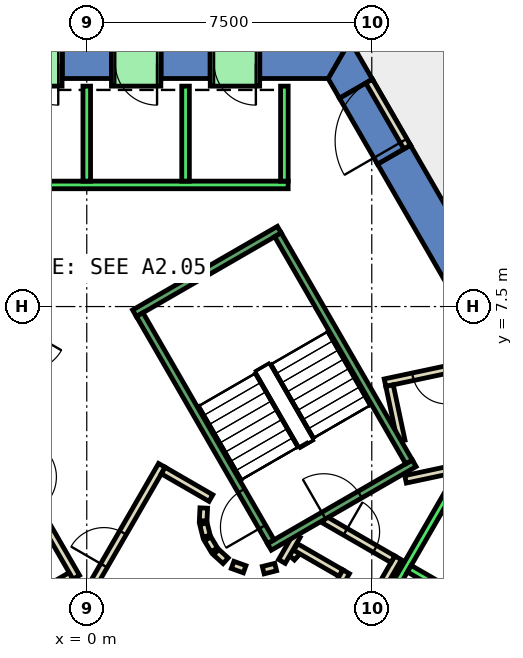
"""IFC4 building model, lengths in metres.
Left out: names, types, materials, properties, quantities, classifications, styles, units other than length and angle.
Written with IfcOpenShell. Run it as: python <this file> out.ifc"""

import sys

from ifc_helpers import new_model, si_unit, direction, frame, frame_2d, origin, place, context, subcontext, project, spatial, polyline, rectangle, outline, extrude, element, fill, save


model = new_model("IFC4")
c1 = context("Model", 3, precision=1e-05, world=origin(), true_north=direction((0.0, 1.0)))
c2 = subcontext(c1, "Body", "Model", "MODEL_VIEW")
j1 = project(units=[si_unit("LENGTHUNIT", "METRE"), si_unit("PLANEANGLEUNIT", "RADIAN")], contexts=[c1])
p1 = place(None, origin())
s1 = spatial("IfcSite", under=j1, at=p1, CompositionType="ELEMENT")
p2 = place(p1, origin())
s2 = spatial("IfcBuilding", under=s1, at=p2, CompositionType="ELEMENT")
p3 = place(p2, frame((0.0, 0.0, 9.0)))
s3 = spatial("IfcBuildingStorey", under=s2, at=p3, CompositionType="ELEMENT", Elevation=9.0)
p4 = place(p3, frame((0.0, 0.0, -0.45)))
e1 = element("IfcWall", 1, at=p4, inside=s3, PredefinedType="SHEAR", context=c2, shape_type="SweptSolid", body=[
    extrude(outline(polyline([(8.517, 11.748), (7.651, 11.248), (12.702, 2.5), (13.856, 2.5), (8.517, 11.748)])), origin(), (0.0, 0.0, 1.0), 6.0),
])
p5 = place(p3, frame((0.0, 0.0, -0.45)))
e2 = element("IfcWall", 2, at=p5, inside=s3, PredefinedType="SHEAR", context=c2, shape_type="SweptSolid", body=[
    extrude(outline(polyline([(6.651, 12.98), (7.517, 13.48), (6.928, 14.5), (6.351, 13.5), (6.651, 12.98)])), origin(), (0.0, 0.0, 1.0), 6.0),
])
p6 = place(p3, frame((0.0, 0.0, 3.6)))
e3 = element("IfcWall", 3, at=p6, inside=s3, PredefinedType="SHEAR", context=c2, shape_type="SweptSolid", body=[
    extrude(outline(polyline([(7.517, 13.48), (6.651, 12.98), (7.651, 11.248), (8.517, 11.748), (7.517, 13.48)])), origin(), (0.0, 0.0, 1.0), 1.95),
])
p7 = place(p3, frame((0.0, 0.0, -0.45)))
e4 = element("IfcWall", 4, at=p7, inside=s3, PredefinedType="SHEAR", context=c2, shape_type="SweptSolid", body=[
    extrude(outline(polyline([(4.55, 14.5), (4.55, 13.5), (6.351, 13.5), (6.928, 14.5), (4.55, 14.5)])), origin(), (0.0, 0.0, 1.0), 6.0),
])
p8 = place(p3, frame((0.0, 0.0, -0.45)))
e5 = element("IfcWall", 5, at=p8, inside=s3, PredefinedType="SHEAR", context=c2, shape_type="SweptSolid", body=[
    extrude(outline(polyline([(1.95, 14.5), (1.95, 13.5), (3.25, 13.5), (3.25, 14.5), (1.95, 14.5)])), origin(), (0.0, 0.0, 1.0), 6.0),
])
p9 = place(p3, frame((0.0, 0.0, -0.45)))
e6 = element("IfcWall", 6, at=p9, inside=s3, PredefinedType="SHEAR", context=c2, shape_type="SweptSolid", body=[
    extrude(outline(polyline([(-0.65, 14.5), (-0.65, 13.5), (0.65, 13.5), (0.65, 14.5), (-0.65, 14.5)])), origin(), (0.0, 0.0, 1.0), 6.0),
])
p10 = place(p3, frame((0.0, 0.0, 3.6)))
e7 = element("IfcWall", 7, at=p10, inside=s3, PredefinedType="SHEAR", context=c2, shape_type="SweptSolid", body=[
    extrude(outline(polyline([(3.25, 14.5), (3.25, 13.5), (4.55, 13.5), (4.55, 14.5), (3.25, 14.5)])), origin(), (0.0, 0.0, 1.0), 1.95),
])
p11 = place(p3, frame((0.0, 0.0, 3.6)))
e8 = element("IfcWall", 8, at=p11, inside=s3, PredefinedType="SHEAR", context=c2, shape_type="SweptSolid", body=[
    extrude(outline(polyline([(0.65, 14.5), (0.65, 13.5), (1.95, 13.5), (1.95, 14.5), (0.65, 14.5)])), origin(), (0.0, 0.0, 1.0), 1.95),
])
p12 = place(p3, frame((0.0, 0.0, 3.6)))
e9 = element("IfcWall", 9, at=p12, inside=s3, PredefinedType="SHEAR", context=c2, shape_type="SweptSolid", body=[
    extrude(outline(polyline([(-1.95, 14.5), (-1.95, 13.5), (-0.65, 13.5), (-0.65, 14.5), (-1.95, 14.5)])), origin(), (0.0, 0.0, 1.0), 1.95),
])
p13 = place(p3, frame((5.39, 0.898, 0.0), z_axis=(0.0, 0.0, 1.0), x_axis=(0.673828488714, 0.738887791073, 0.0)))
e10 = element("IfcWall", 10, at=p13, inside=s3, PredefinedType="PARTITIONING", context=c2, shape_type="SweptSolid", body=[
    extrude(rectangle(XDim=0.263, YDim=0.2, at=frame_2d((0.131, 0.0))), origin(), (0.0, 0.0, 1.0), 5.55),
])
p14 = place(p3, frame((5.499, 1.172, 0.0), z_axis=(0.0, 0.0, 1.0), x_axis=(0.866333505267, -0.499465972466, 0.0)))
e11 = element("IfcWall", 11, at=p14, inside=s3, PredefinedType="PARTITIONING", context=c2, shape_type="SweptSolid", body=[
    extrude(rectangle(XDim=1.374, YDim=0.2, at=frame_2d((0.687, 0.0))), origin(), (0.0, 0.0, 1.0), 5.55),
])
p15 = place(p3, frame((6.826, 0.522, 0.0), z_axis=(0.0, 0.0, 1.0), x_axis=(-0.500016722714, -0.866015748706, 0.0)))
e12 = element("IfcWall", 12, at=p15, inside=s3, PredefinedType="PARTITIONING", context=c2, shape_type="SweptSolid", body=[
    extrude(rectangle(XDim=1.7, YDim=0.2, at=frame_2d((0.85, 0.0))), origin(), (0.0, 0.0, 1.0), 5.55),
])
p16 = place(p3, frame((8.192, 0.888, 0.0), z_axis=(0.0, 0.0, 1.0), x_axis=(-0.499940625693, -0.866059680843, 0.0)))
e13 = element("IfcWall", 13, at=p16, inside=s3, PredefinedType="PARTITIONING", context=c2, shape_type="SweptSolid", body=[
    extrude(rectangle(XDim=2.68, YDim=0.2, at=frame_2d((1.34, 0.0))), origin(), (0.0, 0.0, 1.0), 5.55),
])
p17 = place(p3, frame((5.135, 0.793, 0.0), z_axis=(0.0, 0.0, 1.0), x_axis=(0.499526442893, 0.866298639529, 0.0)))
e14 = element("IfcWall", 14, at=p17, inside=s3, PredefinedType="PARTITIONING", context=c2, shape_type="SweptSolid", body=[
    extrude(rectangle(XDim=0.791, YDim=0.2, at=frame_2d((0.396, 0.0))), origin(), (0.0, 0.0, 1.0), 5.55),
])
p18 = place(p3, frame((6.25, 1.894, 0.0), z_axis=(0.0, 0.0, 1.0), x_axis=(0.866043184279, -0.499969202016, 0.0)))
e15 = element("IfcWall", 15, at=p18, inside=s3, PredefinedType="PARTITIONING", context=c2, shape_type="SweptSolid", body=[
    extrude(rectangle(XDim=2.084, YDim=0.2, at=frame_2d((1.042, 0.0))), origin(), (0.0, 0.0, 1.0), 5.55),
])
p19 = place(p18, frame((0.642, 0.0, 0.0)))
e16 = element("IfcOpeningElement", 16, at=p19, cuts=e15, PredefinedType="OPENING", context=c2, shape_type="SweptSolid", body=[
    extrude(rectangle(XDim=0.9, YDim=2.1, at=frame_2d((0.45, 1.05))), frame((0.0, 0.11, 0.0), z_axis=(0.0, -1.0, 0.0), x_axis=(1.0, 0.0, 0.0)), (0.0, 0.0, 1.0), 0.22),
])
p20 = place(p3, frame((8.389, 2.954, 0.0), z_axis=(0.0, 0.0, 1.0), x_axis=(0.978158333757, 0.207861189501, 0.0)))
e17 = element("IfcWall", 17, at=p20, inside=s3, PredefinedType="PARTITIONING", context=c2, shape_type="SweptSolid", body=[
    extrude(rectangle(XDim=2.4, YDim=0.2, at=frame_2d((1.2, 0.0))), origin(), (0.0, 0.0, 1.0), 5.55),
])
p21 = place(p3, frame((10.196, 5.996, 0.0), z_axis=(0.0, 0.0, 1.0), x_axis=(-0.978155232185, -0.207875784424, 0.0)))
e18 = element("IfcWall", 18, at=p21, inside=s3, PredefinedType="PARTITIONING", context=c2, shape_type="SweptSolid", body=[
    extrude(rectangle(XDim=2.401, YDim=0.2, at=frame_2d((1.2, 0.0))), origin(), (0.0, 0.0, 1.0), 5.55),
])
p22 = place(p21, frame((0.75, 0.0, 0.0)))
e19 = element("IfcOpeningElement", 19, at=p22, cuts=e18, PredefinedType="OPENING", context=c2, shape_type="SweptSolid", body=[
    extrude(rectangle(XDim=0.9, YDim=2.1, at=frame_2d((0.45, 1.05))), frame((0.0, 0.11, 0.0), z_axis=(0.0, -1.0, 0.0), x_axis=(1.0, 0.0, 0.0)), (0.0, 0.0, 1.0), 0.22),
])
p23 = place(p3, frame((7.967, 5.42, 0.0), z_axis=(0.0, 0.0, 1.0), x_axis=(0.207656532783, -0.978201801467, 0.0)))
e20 = element("IfcWall", 20, at=p23, inside=s3, PredefinedType="PARTITIONING", context=c2, shape_type="SweptSolid", body=[
    extrude(rectangle(XDim=1.487, YDim=0.2, at=frame_2d((0.744, 0.0))), origin(), (0.0, 0.0, 1.0), 5.55),
])
p24 = place(p3, frame((3.079, 2.199, 0.0), z_axis=(0.0, 0.0, 1.0), x_axis=(-0.047771483479, -0.998858290933, 0.0)))
e21 = element("IfcWall", 21, at=p24, inside=s3, PredefinedType="PARTITIONING", context=c2, shape_type="SweptSolid", body=[
    extrude(rectangle(XDim=0.337, YDim=0.2, at=frame_2d((0.169, 0.0))), origin(), (0.0, 0.0, 1.0), 5.55),
])
p25 = place(p3, frame((3.07, 1.786, 0.0), z_axis=(0.0, 0.0, 1.0), x_axis=(0.242705583207, -0.970099994784, 0.0)))
e22 = element("IfcWall", 22, at=p25, inside=s3, PredefinedType="PARTITIONING", context=c2, shape_type="SweptSolid", body=[
    extrude(rectangle(XDim=0.338, YDim=0.2, at=frame_2d((0.169, 0.0))), origin(), (0.0, 0.0, 1.0), 5.55),
])
for number, where, z_axis, x_axis in (
    (23, (3.182, 1.388, 0.0), (0.0, 0.0, 1.0), (0.512, -0.859, 0.0)),
    (24, (3.404, 1.039, 0.0), (0.0, 0.0, 1.0), (0.74, -0.672, 0.0)),
):
    element("IfcWall", number, at=place(p3, frame(where, z_axis=z_axis, x_axis=x_axis)), inside=s3, PredefinedType="PARTITIONING", context=c2, shape_type="SweptSolid", body=[
        extrude(rectangle(XDim=0.338, YDim=0.2, at=frame_2d((0.169, 0.0))), origin(), (0.0, 0.0, 1.0), 5.55),
    ])
p26 = place(p3, frame((3.838, 0.702, 0.0), z_axis=(0.0, 0.0, 1.0), x_axis=(0.941035081519, -0.338308993895, 0.0)))
e25 = element("IfcWall", 25, at=p26, inside=s3, PredefinedType="PARTITIONING", context=c2, shape_type="SweptSolid", body=[
    extrude(rectangle(XDim=0.337, YDim=0.2, at=frame_2d((0.168, 0.0))), origin(), (0.0, 0.0, 1.0), 5.55),
])
p27 = place(p3, frame((4.644, 0.564, 0.0), z_axis=(0.0, 0.0, 1.0), x_axis=(0.969929076366, 0.243387729394, 0.0)))
e26 = element("IfcWall", 26, at=p27, inside=s3, PredefinedType="PARTITIONING", context=c2, shape_type="SweptSolid", body=[
    extrude(rectangle(XDim=0.337, YDim=0.2, at=frame_2d((0.168, 0.0))), origin(), (0.0, 0.0, 1.0), 5.55),
])
p28 = place(p3, frame((-0.52, -1.0, 0.0), z_axis=(0.0, 0.0, 1.0), x_axis=(0.50011622646, 0.865958290007, 0.0)))
e27 = element("IfcWall", 27, at=p28, inside=s3, PredefinedType="PARTITIONING", context=c2, shape_type="SweptSolid", body=[
    extrude(rectangle(XDim=4.991, YDim=0.2, at=frame_2d((2.496, 0.0))), origin(), (0.0, 0.0, 1.0), 5.55),
])
p29 = place(p28, frame((1.945, 0.0, 0.0)))
e28 = element("IfcOpeningElement", 28, at=p29, cuts=e27, PredefinedType="OPENING", context=c2, shape_type="SweptSolid", body=[
    extrude(rectangle(XDim=1.0, YDim=2.1, at=frame_2d((0.5, 1.05))), frame((0.0, 0.11, 0.0), z_axis=(0.0, -1.0, 0.0), x_axis=(1.0, 0.0, 0.0)), (0.0, 0.0, 1.0), 0.22),
])
p30 = place(p3, frame((2.012, 3.186, 0.0), z_axis=(0.0, 0.0, 1.0), x_axis=(0.865891012941, -0.500232699559, 0.0)))
e29 = element("IfcWall", 29, at=p30, inside=s3, PredefinedType="PARTITIONING", context=c2, shape_type="SweptSolid", body=[
    extrude(rectangle(XDim=1.449, YDim=0.2, at=frame_2d((0.725, 0.0))), origin(), (0.0, 0.0, 1.0), 5.55),
])
p31 = place(p3, frame((-0.412, 0.414, 0.0), z_axis=(0.0, 0.0, 1.0), x_axis=(-0.866017369001, -0.500013916395, 0.0)))
e30 = element("IfcWall", 30, at=p31, inside=s3, PredefinedType="PARTITIONING", context=c2, shape_type="SweptSolid", body=[
    extrude(rectangle(XDim=1.45, YDim=0.2, at=frame_2d((0.725, 0.0))), origin(), (0.0, 0.0, 1.0), 5.55),
])
p32 = place(p3, frame((-2.771, 4.7, 0.0), z_axis=(0.0, 0.0, 1.0), x_axis=(0.499969479948, -0.866043023828, 0.0)))
e31 = element("IfcWall", 31, at=p32, inside=s3, PredefinedType="PARTITIONING", context=c2, shape_type="SweptSolid", body=[
    extrude(rectangle(XDim=4.99, YDim=0.2, at=frame_2d((2.495, 0.0))), origin(), (0.0, 0.0, 1.0), 5.55),
])
p33 = place(p32, frame((1.945, 0.0, 0.0)))
e32 = element("IfcOpeningElement", 32, at=p33, cuts=e31, PredefinedType="OPENING", context=c2, shape_type="SweptSolid", body=[
    extrude(rectangle(XDim=1.0, YDim=2.1, at=frame_2d((0.5, 1.05))), frame((0.0, 0.11, 0.0), z_axis=(0.0, -1.0, 0.0), x_axis=(1.0, 0.0, 0.0)), (0.0, 0.0, 1.0), 0.22),
])
p34 = place(p3, frame((8.43, 11.698, 0.0), z_axis=(0.0, 0.0, 1.0), x_axis=(-0.50002537861, 0.866010750942, 0.0)))
e33 = element("IfcWall", 33, at=p34, inside=s3, PredefinedType="PARTITIONING", context=c2, shape_type="SweptSolid", body=[
    extrude(rectangle(XDim=2.0, YDim=0.2, at=frame_2d((1.0, 0.0))), origin(), (0.0, 0.0, 1.0), 2.4),
])
p35 = place(p34, frame((0.19, 0.0, 0.0)))
e34 = element("IfcOpeningElement", 34, at=p35, cuts=e33, PredefinedType="OPENING", context=c2, shape_type="SweptSolid", body=[
    extrude(rectangle(XDim=1.8, YDim=2.1, at=frame_2d((0.9, 1.05))), frame((0.0, 0.11, 0.0), z_axis=(0.0, -1.0, 0.0), x_axis=(1.0, 0.0, 0.0)), (0.0, 0.0, 1.0), 0.22),
])
p36 = place(p3, frame((5.3, 10.7, 0.0), z_axis=(0.0, 0.0, 1.0), x_axis=(-1.0, 0.0, 0.0)))
e35 = element("IfcWall", 35, at=p36, inside=s3, PredefinedType="STANDARD", context=c2, shape_type="SweptSolid", body=[
    extrude(rectangle(XDim=10.6, YDim=0.2, at=frame_2d((5.3, 0.0))), origin(), (0.0, 0.0, 1.0), 5.55),
])
for number, where, z_axis, x_axis in (
    (36, (5.2, 10.8, 0.0), (0.0, 0.0, 1.0), (0.0, 1.0, 0.0)),
    (37, (2.6, 10.8, 0.0), (0.0, 0.0, 1.0), (0.0, 1.0, 0.0)),
    (38, (0.0, 10.8, 0.0), (0.0, 0.0, 1.0), (0.0, 1.0, 0.0)),
):
    element("IfcWall", number, at=place(p3, frame(where, z_axis=z_axis, x_axis=x_axis)), inside=s3, PredefinedType="STANDARD", context=c2, shape_type="SweptSolid", body=[
        extrude(rectangle(XDim=2.5, YDim=0.2, at=frame_2d((1.25, 0.0))), origin(), (0.0, 0.0, 1.0), 5.55),
    ])
p37 = place(p3, frame((4.451, -6.19, 0.0), z_axis=(0.0, 0.0, 1.0), x_axis=(0.50000090737, 0.866024879913, 0.0)))
e39 = element("IfcWall", 39, at=p37, inside=s3, PredefinedType="STANDARD", context=c2, shape_type="SweptSolid", body=[
    extrude(rectangle(XDim=10.6, YDim=0.2, at=frame_2d((5.3, 0.0))), origin(), (0.0, 0.0, 1.0), 5.55),
])
p38 = place(p3, frame((8.488, 0.602, 0.0), z_axis=(0.0, 0.0, 1.0), x_axis=(0.866022959057, -0.500004234368, 0.0)))
e40 = element("IfcWall", 40, at=p38, inside=s3, PredefinedType="STANDARD", context=c2, shape_type="SweptSolid", body=[
    extrude(rectangle(XDim=2.5, YDim=0.2, at=frame_2d((1.25, 0.0))), origin(), (0.0, 0.0, 1.0), 5.55),
])
p39 = place(p3, frame((4.55, 13.9, 0.0), z_axis=(0.0, 0.0, 1.0), x_axis=(-1.0, 0.0, 0.0)))
e41 = element("IfcWall", 41, at=p39, inside=s3, PredefinedType="STANDARD", context=c2, shape_type="SweptSolid", body=[
    extrude(rectangle(XDim=1.3, YDim=1.2, at=frame_2d((0.65, 0.0))), origin(), (0.0, 0.0, 1.0), 2.4),
])
p40 = place(p39, frame((0.1, 0.0, 0.0)))
e42 = element("IfcOpeningElement", 42, at=p40, cuts=e41, PredefinedType="OPENING", context=c2, shape_type="SweptSolid", body=[
    extrude(rectangle(XDim=1.1, YDim=2.3, at=frame_2d((0.55, 1.15))), frame((0.0, 0.61, 0.0), z_axis=(0.0, -1.0, 0.0), x_axis=(1.0, 0.0, 0.0)), (0.0, 0.0, 1.0), 1.22),
])
p41 = place(p3, frame((1.95, 13.9, 0.0), z_axis=(0.0, 0.0, 1.0), x_axis=(-1.0, 0.0, 0.0)))
e43 = element("IfcWall", 43, at=p41, inside=s3, PredefinedType="STANDARD", context=c2, shape_type="SweptSolid", body=[
    extrude(rectangle(XDim=1.3, YDim=1.2, at=frame_2d((0.65, 0.0))), origin(), (0.0, 0.0, 1.0), 2.4),
])
p42 = place(p41, frame((0.1, 0.0, 0.0)))
e44 = element("IfcOpeningElement", 44, at=p42, cuts=e43, PredefinedType="OPENING", context=c2, shape_type="SweptSolid", body=[
    extrude(rectangle(XDim=1.1, YDim=2.3, at=frame_2d((0.55, 1.15))), frame((0.0, 0.61, 0.0), z_axis=(0.0, -1.0, 0.0), x_axis=(1.0, 0.0, 0.0)), (0.0, 0.0, 1.0), 1.22),
])
p43 = place(p3, frame((-0.65, 13.9, 0.0), z_axis=(0.0, 0.0, 1.0), x_axis=(-1.0, 0.0, 0.0)))
e45 = element("IfcWall", 45, at=p43, inside=s3, PredefinedType="STANDARD", context=c2, shape_type="SweptSolid", body=[
    extrude(rectangle(XDim=1.3, YDim=1.2, at=frame_2d((0.65, 0.0))), origin(), (0.0, 0.0, 1.0), 2.4),
])
p44 = place(p43, frame((0.1, 0.0, 0.0)))
e46 = element("IfcOpeningElement", 46, at=p44, cuts=e45, PredefinedType="OPENING", context=c2, shape_type="SweptSolid", body=[
    extrude(rectangle(XDim=1.1, YDim=2.3, at=frame_2d((0.55, 1.15))), frame((0.0, 0.61, 0.0), z_axis=(0.0, -1.0, 0.0), x_axis=(1.0, 0.0, 0.0)), (0.0, 0.0, 1.0), 1.22),
])
p45 = place(p3, frame((4.806, 1.176, 0.0), z_axis=(0.0, 0.0, 1.0), x_axis=(0.866059941101, 0.499940174841, 0.0)))
e47 = element("IfcWall", 47, at=p45, inside=s3, PredefinedType="STANDARD", context=c2, shape_type="SweptSolid", body=[
    extrude(rectangle(XDim=4.4, YDim=0.2, at=frame_2d((2.2, 0.0))), origin(), (0.0, 0.0, 1.0), 5.55),
])
p46 = place(p45, frame((1.65, 0.0, 0.0)))
e48 = element("IfcOpeningElement", 48, at=p46, cuts=e47, PredefinedType="OPENING", context=c2, shape_type="SweptSolid", body=[
    extrude(rectangle(XDim=1.1, YDim=2.2, at=frame_2d((0.55, 1.1))), frame((0.0, 0.11, 0.0), z_axis=(0.0, -1.0, 0.0), x_axis=(1.0, 0.0, 0.0)), (0.0, 0.0, 1.0), 0.22),
])
p47 = place(p3, frame((1.256, 7.324, 0.0), z_axis=(0.0, 0.0, 1.0), x_axis=(0.866046073146, 0.499964197906, 0.0)))
e49 = element("IfcWall", 49, at=p47, inside=s3, PredefinedType="STANDARD", context=c2, shape_type="SweptSolid", body=[
    extrude(rectangle(XDim=4.4, YDim=0.2, at=frame_2d((2.2, 0.0))), origin(), (0.0, 0.0, 1.0), 5.55),
])
p48 = place(p3, frame((4.843, 1.312, 0.0), z_axis=(0.0, 0.0, 1.0), x_axis=(-0.499963383562, 0.866046543262, 0.0)))
e50 = element("IfcWall", 50, at=p48, inside=s3, PredefinedType="STANDARD", context=c2, shape_type="SweptSolid", body=[
    extrude(rectangle(XDim=6.9, YDim=0.2, at=frame_2d((3.45, 0.0))), origin(), (0.0, 0.0, 1.0), 5.55),
])
p49 = place(p48, frame((0.45, 0.0, 0.0)))
e51 = element("IfcOpeningElement", 51, at=p49, cuts=e50, PredefinedType="OPENING", context=c2, shape_type="SweptSolid", body=[
    extrude(rectangle(XDim=1.1, YDim=2.2, at=frame_2d((0.55, 1.1))), frame((0.0, 0.11, 0.0), z_axis=(0.0, -1.0, 0.0), x_axis=(1.0, 0.0, 0.0)), (0.0, 0.0, 1.0), 0.22),
])
p50 = place(p3, frame((8.48, 3.412, 0.0), z_axis=(0.0, 0.0, 1.0), x_axis=(-0.499978703459, 0.866037698999, 0.0)))
e52 = element("IfcWall", 52, at=p50, inside=s3, PredefinedType="STANDARD", context=c2, shape_type="SweptSolid", body=[
    extrude(rectangle(XDim=6.9, YDim=0.2, at=frame_2d((3.45, 0.0))), origin(), (0.0, 0.0, 1.0), 5.55),
])
p51 = place(p29, origin())
e53 = element("IfcDoor", 53, at=p51, inside=s3, OperationType="SINGLE_SWING_LEFT", PredefinedType="DOOR", context=c2, shape_type="SweptSolid", body=[
    extrude(rectangle(XDim=1.0, YDim=2.1, at=frame_2d((0.5, 1.05))), frame((0.0, 0.025, 0.0), z_axis=(0.0, -1.0, 0.0), x_axis=(1.0, 0.0, 0.0)), (0.0, 0.0, 1.0), 0.05),
])
fill(e28, e53)
p52 = place(p19, origin())
e54 = element("IfcDoor", 54, at=p52, inside=s3, OperationType="SINGLE_SWING_LEFT", PredefinedType="DOOR", context=c2, shape_type="SweptSolid", body=[
    extrude(rectangle(XDim=0.9, YDim=2.1, at=frame_2d((0.45, 1.05))), frame((0.0, 0.025, 0.0), z_axis=(0.0, -1.0, 0.0), x_axis=(1.0, 0.0, 0.0)), (0.0, 0.0, 1.0), 0.05),
])
fill(e16, e54)
p53 = place(p22, origin())
e55 = element("IfcDoor", 55, at=p53, inside=s3, OperationType="SINGLE_SWING_LEFT", PredefinedType="DOOR", context=c2, shape_type="SweptSolid", body=[
    extrude(rectangle(XDim=0.9, YDim=2.1, at=frame_2d((0.45, 1.05))), frame((0.0, 0.025, 0.0), z_axis=(0.0, -1.0, 0.0), x_axis=(1.0, 0.0, 0.0)), (0.0, 0.0, 1.0), 0.05),
])
fill(e19, e55)
p54 = place(p35, origin())
e56 = element("IfcDoor", 56, at=p54, inside=s3, OperationType="DOUBLE_DOOR_SINGLE_SWING", PredefinedType="DOOR", context=c2, shape_type="SweptSolid", body=[
    extrude(rectangle(XDim=1.8, YDim=2.1, at=frame_2d((0.9, 1.05))), frame((0.0, 0.025, 0.0), z_axis=(0.0, -1.0, 0.0), x_axis=(1.0, 0.0, 0.0)), (0.0, 0.0, 1.0), 0.05),
])
fill(e34, e56)
p55 = place(p40, origin())
e57 = element("IfcDoor", 57, at=p55, inside=s3, OperationType="SLIDING_TO_LEFT", PredefinedType="DOOR", context=c2, shape_type="SweptSolid", body=[
    extrude(rectangle(XDim=1.1, YDim=2.3, at=frame_2d((0.55, 1.15))), frame((0.0, 0.025, 0.0), z_axis=(0.0, -1.0, 0.0), x_axis=(1.0, 0.0, 0.0)), (0.0, 0.0, 1.0), 0.05),
])
fill(e42, e57)
p56 = place(p42, origin())
e58 = element("IfcDoor", 58, at=p56, inside=s3, OperationType="SLIDING_TO_LEFT", PredefinedType="DOOR", context=c2, shape_type="SweptSolid", body=[
    extrude(rectangle(XDim=1.1, YDim=2.3, at=frame_2d((0.55, 1.15))), frame((0.0, 0.025, 0.0), z_axis=(0.0, -1.0, 0.0), x_axis=(1.0, 0.0, 0.0)), (0.0, 0.0, 1.0), 0.05),
])
fill(e44, e58)
p57 = place(p44, origin())
e59 = element("IfcDoor", 59, at=p57, inside=s3, OperationType="SLIDING_TO_LEFT", PredefinedType="DOOR", context=c2, shape_type="SweptSolid", body=[
    extrude(rectangle(XDim=1.1, YDim=2.3, at=frame_2d((0.55, 1.15))), frame((0.0, 0.025, 0.0), z_axis=(0.0, -1.0, 0.0), x_axis=(1.0, 0.0, 0.0)), (0.0, 0.0, 1.0), 0.05),
])
fill(e46, e59)
p58 = place(p49, origin())
e60 = element("IfcDoor", 60, at=p58, inside=s3, OperationType="SINGLE_SWING_LEFT", PredefinedType="DOOR", context=c2, shape_type="SweptSolid", body=[
    extrude(rectangle(XDim=1.1, YDim=2.2, at=frame_2d((0.55, 1.1))), frame((0.0, 0.025, 0.0), z_axis=(0.0, -1.0, 0.0), x_axis=(1.0, 0.0, 0.0)), (0.0, 0.0, 1.0), 0.05),
])
fill(e51, e60)
p59 = place(p46, origin())
e61 = element("IfcDoor", 61, at=p59, inside=s3, OperationType="SINGLE_SWING_LEFT", PredefinedType="DOOR", context=c2, shape_type="SweptSolid", body=[
    extrude(rectangle(XDim=1.1, YDim=2.2, at=frame_2d((0.55, 1.1))), frame((0.0, 0.025, 0.0), z_axis=(0.0, -1.0, 0.0), x_axis=(1.0, 0.0, 0.0)), (0.0, 0.0, 1.0), 0.05),
])
fill(e48, e61)
save(model, sys.argv[1])
